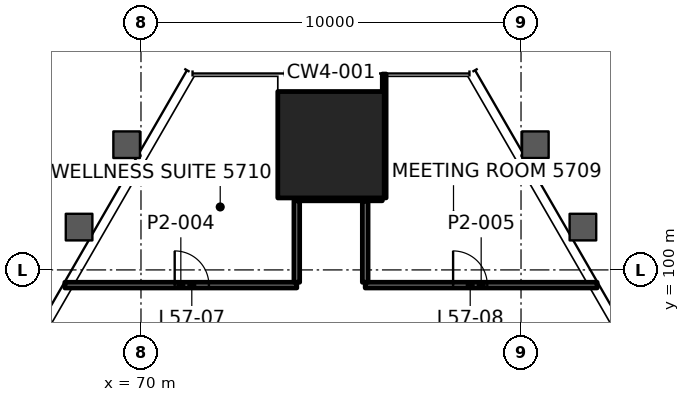
"""IFC4 building model, lengths in metres.
Left out: names, types, materials, properties, quantities, classifications, styles, units other than length and angle.
Written with IfcOpenShell. Run it as: python <this file> out.ifc"""

import sys

from ifc_helpers import new_model, si_unit, direction, frame, frame_2d, origin, origin_2d, place, context, subcontext, project, spatial, rectangle, extrude, element, fill, save


model = new_model("IFC4")
c1 = context("Model", 3, precision=1e-05, world=origin(), true_north=direction((0.0, 1.0)))
c2 = subcontext(c1, "Body", "Model", "MODEL_VIEW")
j1 = project(units=[si_unit("LENGTHUNIT", "METRE"), si_unit("PLANEANGLEUNIT", "RADIAN")], contexts=[c1])
p1 = place(None, origin())
s1 = spatial("IfcSite", under=j1, at=p1, CompositionType="ELEMENT")
p2 = place(p1, origin())
s2 = spatial("IfcBuilding", under=s1, at=p2, CompositionType="ELEMENT")
p3 = place(p2, frame((0.0, 0.0, 241.6)))
s3 = spatial("IfcBuildingStorey", under=s2, at=p3, CompositionType="ELEMENT", Elevation=241.6)
p4 = place(p3, frame((75.0, 103.294, 0.0), z_axis=(0.0, 0.0, 1.0), x_axis=(-1.0, 0.0, 0.0)))
e1 = element("IfcColumn", 1, at=p4, inside=s3, PredefinedType="COLUMN", context=c2, shape_type="SweptSolid", body=[
    extrude(rectangle(XDim=2.8, YDim=2.8, at=origin_2d()), origin(), (0.0, 0.0, 1.0), 6.0),
])
p5 = place(p3, frame((67.997, 99.6, 0.0), z_axis=(0.0, 0.0, 1.0), x_axis=(1.0, 0.0, 0.0)))
e2 = element("IfcWall", 2, at=p5, inside=s3, PredefinedType="PARTITIONING", context=c2, shape_type="SweptSolid", body=[
    extrude(rectangle(XDim=6.103, YDim=0.15, at=frame_2d((3.052, 0.0))), origin(), (0.0, 0.0, 1.0), 4.95),
])
p6 = place(p5, frame((2.89, 0.0, 0.0)))
e3 = element("IfcOpeningElement", 3, at=p6, cuts=e2, PredefinedType="OPENING", context=c2, shape_type="SweptSolid", body=[
    extrude(rectangle(XDim=0.9, YDim=2.1, at=frame_2d((0.45, 1.05))), frame((0.0, 0.085, 0.0), z_axis=(0.0, -1.0, 0.0), x_axis=(1.0, 0.0, 0.0)), (0.0, 0.0, 1.0), 0.17),
])
p7 = place(p3, frame((75.9, 99.6, 0.0), z_axis=(0.0, 0.0, 1.0), x_axis=(1.0, 0.0, 0.0)))
e4 = element("IfcWall", 4, at=p7, inside=s3, PredefinedType="PARTITIONING", context=c2, shape_type="SweptSolid", body=[
    extrude(rectangle(XDim=6.103, YDim=0.15, at=frame_2d((3.052, 0.0))), origin(), (0.0, 0.0, 1.0), 4.95),
])
p8 = place(p7, frame((2.313, 0.0, 0.0)))
e5 = element("IfcOpeningElement", 5, at=p8, cuts=e4, PredefinedType="OPENING", context=c2, shape_type="SweptSolid", body=[
    extrude(rectangle(XDim=0.9, YDim=2.1, at=frame_2d((0.45, 1.05))), frame((0.0, 0.085, 0.0), z_axis=(0.0, -1.0, 0.0), x_axis=(1.0, 0.0, 0.0)), (0.0, 0.0, 1.0), 0.17),
])
p9 = place(p3, frame((74.101, 101.894, 0.0), z_axis=(0.0, 0.0, 1.0), x_axis=(1.0, 0.0, 0.0)))
e6 = element("IfcWall", 6, at=p9, inside=s3, PredefinedType="PARTITIONING", context=c2, shape_type="SweptSolid", body=[
    extrude(rectangle(XDim=2.249, YDim=0.15, at=frame_2d((1.125, 0.0))), origin(), (0.0, 0.0, 1.0), 4.947),
])
p10 = place(p3, frame((76.4, 101.895, 0.0), z_axis=(0.0, 0.0, 1.0), x_axis=(0.0, 1.0, 0.0)))
e7 = element("IfcWall", 7, at=p10, inside=s3, PredefinedType="PARTITIONING", context=c2, shape_type="SweptSolid", body=[
    extrude(rectangle(XDim=3.26, YDim=0.1, at=frame_2d((1.63, 0.0))), origin(), (0.0, 0.0, 1.0), 4.95),
])
p11 = place(p3, frame((75.9, 99.675, 0.0), z_axis=(0.0, 0.0, 1.0), x_axis=(0.0, 1.0, 0.0)))
e8 = element("IfcWall", 8, at=p11, inside=s3, PredefinedType="PARTITIONING", context=c2, shape_type="SweptSolid", body=[
    extrude(rectangle(XDim=2.134, YDim=0.15, at=frame_2d((1.067, 0.0))), origin(), (0.0, 0.0, 1.0), 4.95),
])
p12 = place(p3, frame((74.1, 99.675, 0.0), z_axis=(0.0, 0.0, 1.0), x_axis=(0.0, 1.0, 0.0)))
e9 = element("IfcWall", 9, at=p12, inside=s3, PredefinedType="PARTITIONING", context=c2, shape_type="SweptSolid", body=[
    extrude(rectangle(XDim=2.144, YDim=0.15, at=frame_2d((1.072, 0.0))), origin(), (0.0, 0.0, 1.0), 4.95),
])
p13 = place(p6, origin())
e10 = element("IfcDoor", 10, at=p13, inside=s3, OperationType="SINGLE_SWING_LEFT", PredefinedType="DOOR", context=c2, shape_type="SweptSolid", body=[
    extrude(rectangle(XDim=0.9, YDim=2.1, at=frame_2d((0.45, 1.05))), frame((0.0, 0.025, 0.0), z_axis=(0.0, -1.0, 0.0), x_axis=(1.0, 0.0, 0.0)), (0.0, 0.0, 1.0), 0.05),
])
fill(e3, e10)
p14 = place(p8, origin())
e11 = element("IfcDoor", 11, at=p14, inside=s3, OperationType="SINGLE_SWING_RIGHT", PredefinedType="DOOR", context=c2, shape_type="SweptSolid", body=[
    extrude(rectangle(XDim=0.9, YDim=2.1, at=frame_2d((0.45, 1.05))), frame((0.0, 0.025, 0.0), z_axis=(0.0, -1.0, 0.0), x_axis=(1.0, 0.0, 0.0)), (0.0, 0.0, 1.0), 0.05),
])
fill(e5, e11)
save(model, sys.argv[1])
